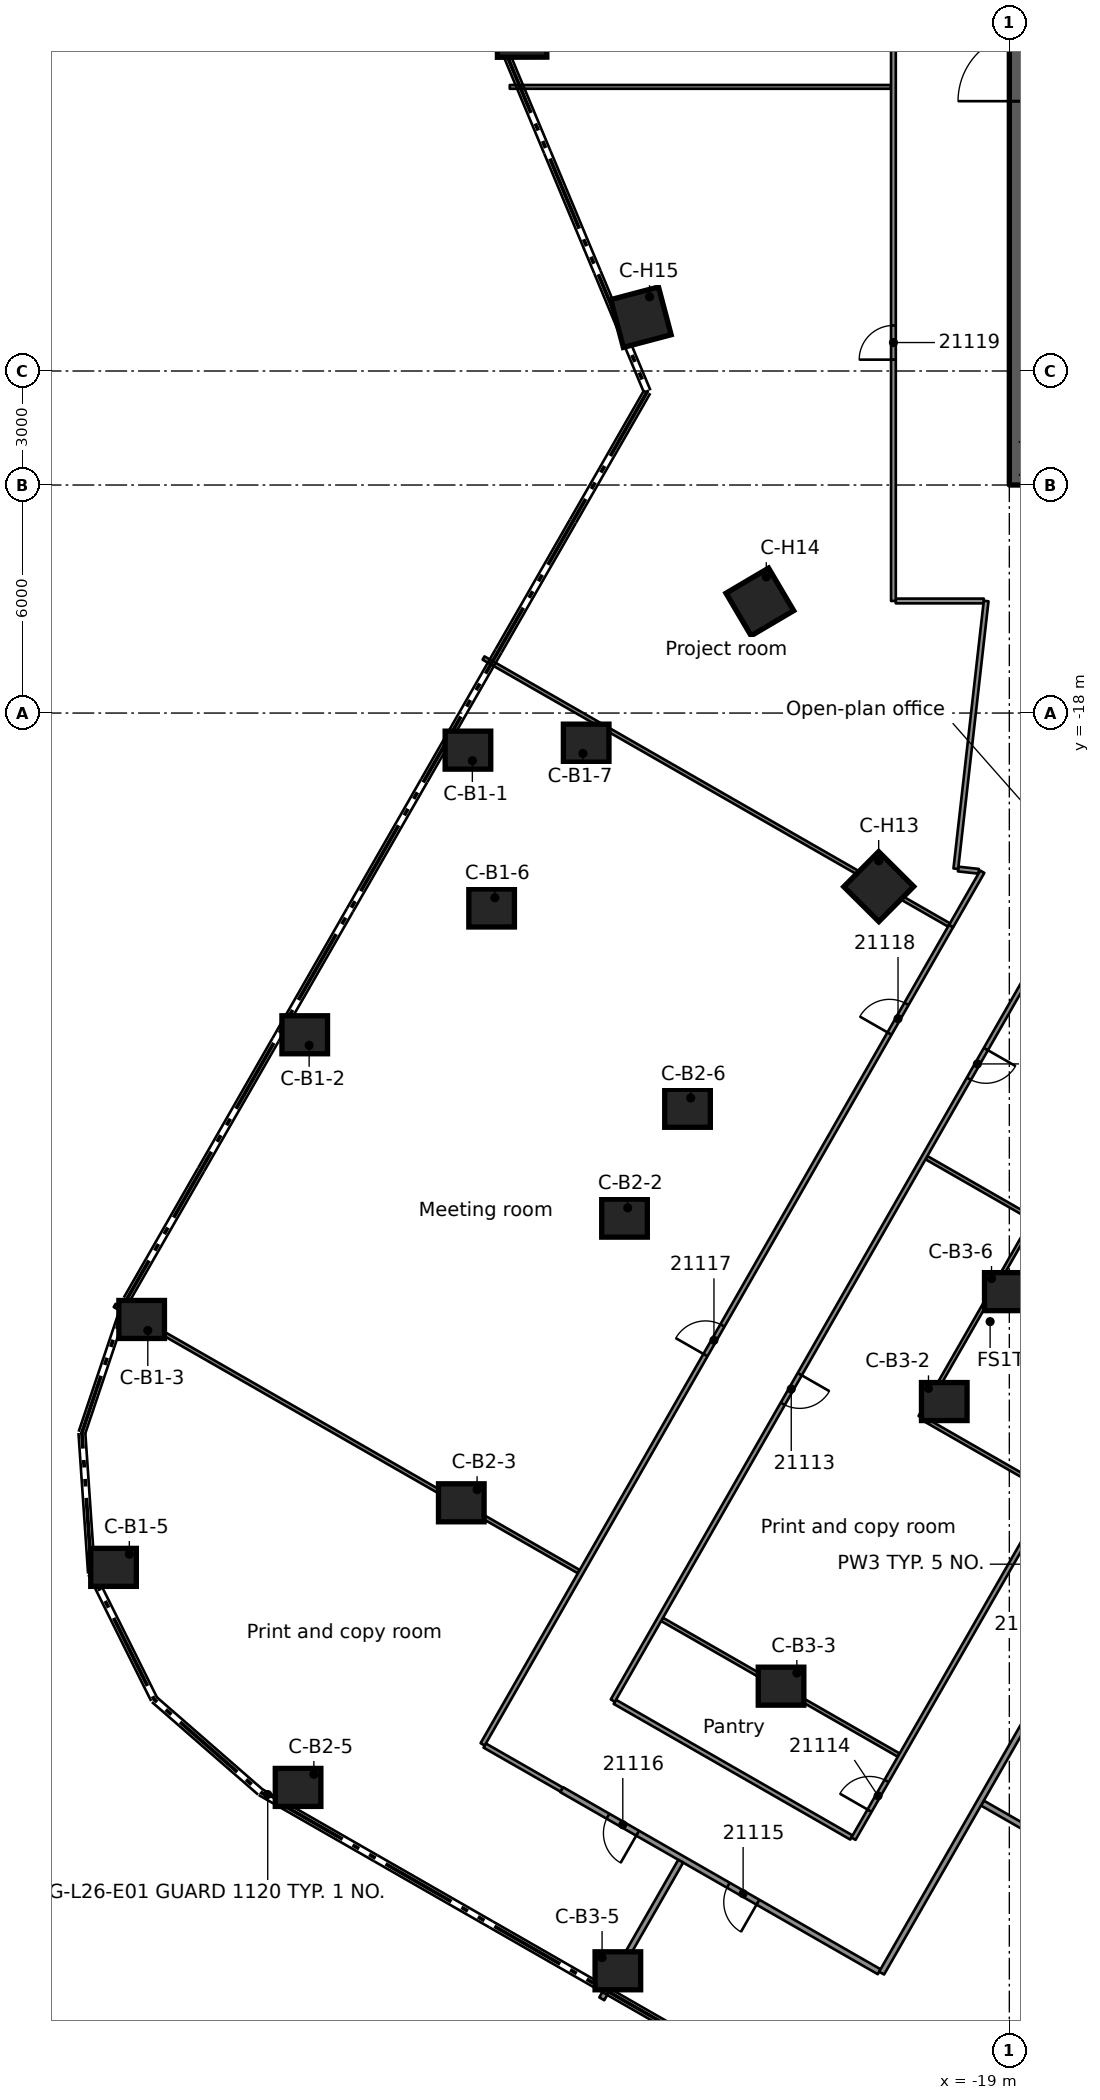
"""IFC4 building model, lengths in metres.
Left out: names, types, materials, properties, quantities, classifications, styles, units other than length and angle.
Written with IfcOpenShell. Run it as: python <this file> out.ifc"""

import sys

from ifc_helpers import new_model, si_unit, direction, frame, frame_2d, origin, origin_2d, place, context, subcontext, project, spatial, rectangle, extrude, element, fill, save


model = new_model("IFC4")
c1 = context("Model", 3, precision=1e-05, world=origin(), true_north=direction((0.0, 1.0)))
c2 = subcontext(c1, "Body", "Model", "MODEL_VIEW")
j1 = project(units=[si_unit("LENGTHUNIT", "METRE"), si_unit("PLANEANGLEUNIT", "RADIAN")], contexts=[c1])
p1 = place(None, origin())
s1 = spatial("IfcSite", under=j1, at=p1, CompositionType="ELEMENT")
p2 = place(p1, origin())
s2 = spatial("IfcBuilding", under=s1, at=p2, CompositionType="ELEMENT")
p3 = place(p2, frame((0.0, 0.0, 105.7)))
s3 = spatial("IfcBuildingStorey", under=s2, at=p3, CompositionType="ELEMENT", Elevation=105.7)
p4 = place(p3, frame((-18.55, -12.0, 0.0), z_axis=(0.0, 0.0, 1.0), x_axis=(0.0, 1.0, 0.0)))
e1 = element("IfcWall", 1, at=p4, inside=s3, PredefinedType="SHEAR", context=c2, shape_type="SweptSolid", body=[
    extrude(rectangle(XDim=24.0, YDim=0.9, at=frame_2d((12.0, 0.0))), origin(), (0.0, 0.0, 1.0), 3.5),
])
p5 = place(p4, frame((10.1, 0.0, 0.0)))
e2 = element("IfcOpeningElement", 2, at=p5, cuts=e1, PredefinedType="OPENING", context=c2, shape_type="SweptSolid", body=[
    extrude(rectangle(XDim=1.8, YDim=2.1, at=frame_2d((0.9, 1.05))), frame((0.0, 0.46, 0.0), z_axis=(0.0, -1.0, 0.0), x_axis=(1.0, 0.0, 0.0)), (0.0, 0.0, 1.0), 0.92),
])
for number, where, z_axis, x_axis in (
    (3, (-33.246, -18.976, 0.0), (0.0, 0.0, 1.0), (1.0, 0.0, 0.0)),
    (4, (-37.541, -26.465, 0.0), (0.0, 0.0, 1.0), (1.0, 0.0, 0.0)),
    (5, (-41.832, -33.956, 0.0), (0.0, 0.0, 1.0), (1.0, 0.0, 0.0)),
    (6, (-42.572, -40.479, 0.0), (0.0, 0.0, 1.0), (1.0, 0.0, 0.0)),
    (7, (-32.623, -23.129, 0.0), (0.0, 0.0, 1.0), (1.0, 0.0, 0.0)),
    (8, (-30.135, -18.792, 0.0), (0.0, 0.0, 1.0), (1.0, 0.0, 0.0)),
    (9, (-29.126, -31.29, 0.0), (0.0, 0.0, 1.0), (1.0, 0.0, 0.0)),
    (10, (-33.421, -38.78, 0.0), (0.0, 0.0, 1.0), (1.0, 0.0, 0.0)),
    (11, (-37.716, -46.269, 0.0), (0.0, 0.0, 1.0), (1.0, 0.0, 0.0)),
    (12, (-27.468, -28.399, 0.0), (0.0, 0.0, 1.0), (1.0, 0.0, 0.0)),
    (13, (-20.712, -36.116, 0.0), (0.0, 0.0, 1.0), (1.0, 0.0, 0.0)),
    (14, (-25.007, -43.605, 0.0), (0.0, 0.0, 1.0), (1.0, 0.0, 0.0)),
    (15, (-29.301, -51.094, 0.0), (0.0, 0.0, 1.0), (1.0, 0.0, 0.0)),
    (16, (-19.053, -33.224, 0.0), (0.0, 0.0, 1.0), (1.0, 0.0, 0.0)),
):
    element("IfcColumn", number, at=place(p3, frame(where, z_axis=z_axis, x_axis=x_axis)), inside=s3, PredefinedType="COLUMN", context=c2, shape_type="SweptSolid", body=[
        extrude(rectangle(XDim=1.2, YDim=1.0, at=origin_2d()), origin(), (0.0, 0.0, 1.0), 3.5),
    ])
for number, where, z_axis, x_axis in (
    (17, (-22.436, -22.567, 0.0), (0.0, 0.0, 1.0), (-0.705, -0.709, 0.0)),
    (18, (-25.565, -15.076, 0.0), (0.0, 0.0, 1.0), (-0.861, -0.508, 0.0)),
    (19, (-28.694, -7.584, 0.0), (0.0, 0.0, 1.0), (-0.967, -0.256, 0.0)),
    (20, (-31.822, -0.093, 0.0), (0.0, 0.0, 1.0), (-1.0, -0.003, 0.0)),
):
    element("IfcColumn", number, at=place(p3, frame(where, z_axis=z_axis, x_axis=x_axis)), inside=s3, PredefinedType="COLUMN", context=c2, shape_type="SweptSolid", body=[
        extrude(rectangle(XDim=1.3, YDim=1.3, at=origin_2d()), origin(), (0.0, 0.0, 1.0), 3.5),
    ])
p6 = place(p3, frame((-32.805, -45.167, 0.0), z_axis=(0.0, 0.0, 1.0), x_axis=(0.867850650995, -0.496825168009, 0.0)))
e21 = element("IfcWall", 21, at=p6, inside=s3, PredefinedType="PARTITIONING", context=c2, shape_type="SweptSolid", body=[
    extrude(rectangle(XDim=2.337, YDim=0.125, at=frame_2d((1.168, 0.0))), origin(), (0.0, 0.0, 1.0), 3.08),
])
p7 = place(p3, frame((-22.424, -51.119, 0.0), z_axis=(0.0, 0.0, 1.0), x_axis=(-0.867497896771, 0.497440849849, 0.0)))
e22 = element("IfcWall", 22, at=p7, inside=s3, PredefinedType="PARTITIONING", context=c2, shape_type="SweptSolid", body=[
    extrude(rectangle(XDim=9.629, YDim=0.15, at=frame_2d((4.814, 0.0))), origin(), (0.0, 0.0, 1.0), 3.08),
])
p8 = place(p7, frame((3.678, 0.0, 0.0)))
e23 = element("IfcOpeningElement", 23, at=p8, cuts=e22, PredefinedType="OPENING", context=c2, shape_type="SweptSolid", body=[
    extrude(rectangle(XDim=0.9, YDim=2.1, at=frame_2d((0.45, 1.05))), frame((0.0, 0.085, 0.0), z_axis=(0.0, -1.0, 0.0), x_axis=(1.0, 0.0, 0.0)), (0.0, 0.0, 1.0), 0.17),
])
p9 = place(p7, frame((7.328, 0.0, 0.0)))
e24 = element("IfcOpeningElement", 24, at=p9, cuts=e22, PredefinedType="OPENING", context=c2, shape_type="SweptSolid", body=[
    extrude(rectangle(XDim=0.9, YDim=2.1, at=frame_2d((0.45, 1.05))), frame((0.0, 0.085, 0.0), z_axis=(0.0, -1.0, 0.0), x_axis=(1.0, 0.0, 0.0)), (0.0, 0.0, 1.0), 0.17),
])
p10 = place(p3, frame((-29.38, -44.017, 0.0), z_axis=(0.0, 0.0, 1.0), x_axis=(0.867475811481, -0.497479362885, 0.0)))
e25 = element("IfcWall", 25, at=p10, inside=s3, PredefinedType="PARTITIONING", context=c2, shape_type="SweptSolid", body=[
    extrude(rectangle(XDim=7.176, YDim=0.125, at=frame_2d((3.588, 0.0))), origin(), (0.0, 0.0, 1.0), 3.08),
])
p11 = place(p3, frame((-42.542, -33.587, 0.0), z_axis=(0.0, 0.0, 1.0), x_axis=(0.867466270896, -0.497495998835, 0.0)))
e26 = element("IfcWall", 26, at=p11, inside=s3, PredefinedType="PARTITIONING", context=c2, shape_type="SweptSolid", body=[
    extrude(rectangle(XDim=14.079, YDim=0.1, at=frame_2d((7.04, 0.0))), origin(), (0.0, 0.0, 1.0), 3.08),
])
p12 = place(p3, frame((-28.138, -41.848, 0.0), z_axis=(0.0, 0.0, 1.0), x_axis=(0.867478179125, -0.4974752343, 0.0)))
e27 = element("IfcWall", 27, at=p12, inside=s3, PredefinedType="PARTITIONING", context=c2, shape_type="SweptSolid", body=[
    extrude(rectangle(XDim=7.178, YDim=0.1, at=frame_2d((3.589, 0.0))), origin(), (0.0, 0.0, 1.0), 3.08),
])
p13 = place(p3, frame((-19.709, -46.681, 0.0), z_axis=(0.0, 0.0, 1.0), x_axis=(0.867456145265, -0.497513654126, 0.0)))
e28 = element("IfcWall", 28, at=p13, inside=s3, PredefinedType="PARTITIONING", context=c2, shape_type="SweptSolid", body=[
    extrude(rectangle(XDim=14.07, YDim=0.15, at=frame_2d((7.035, 0.0))), origin(), (0.0, 0.0, 1.0), 3.08),
])
p14 = place(p3, frame((-21.302, -36.546, 0.0), z_axis=(0.0, 0.0, 1.0), x_axis=(0.867492112241, -0.49745093748, 0.0)))
e29 = element("IfcWall", 29, at=p14, inside=s3, PredefinedType="PARTITIONING", context=c2, shape_type="SweptSolid", body=[
    extrude(rectangle(XDim=3.886, YDim=0.1, at=frame_2d((1.943, 0.0))), origin(), (0.0, 0.0, 1.0), 3.08),
])
p15 = place(p3, frame((-21.181, -29.699, 0.0), z_axis=(0.0, 0.0, 1.0), x_axis=(0.867554846835, -0.497341520219, 0.0)))
e30 = element("IfcWall", 30, at=p15, inside=s3, PredefinedType="PARTITIONING", context=c2, shape_type="SweptSolid", body=[
    extrude(rectangle(XDim=7.19, YDim=0.1, at=frame_2d((3.595, 0.0))), origin(), (0.0, 0.0, 1.0), 3.08),
])
p16 = place(p3, frame((-32.836, -16.552, 0.0), z_axis=(0.0, 0.0, 1.0), x_axis=(0.867495211783, -0.497445532229, 0.0)))
e31 = element("IfcWall", 31, at=p16, inside=s3, PredefinedType="PARTITIONING", context=c2, shape_type="SweptSolid", body=[
    extrude(rectangle(XDim=14.12, YDim=0.1, at=frame_2d((7.06, 0.0))), origin(), (0.0, 0.0, 1.0), 3.08),
])
p17 = place(p3, frame((-20.345, -22.104, 0.0), z_axis=(0.0, 0.0, 1.0), x_axis=(0.993828621155, -0.110926425047, 0.0)))
e32 = element("IfcWall", 32, at=p17, inside=s3, PredefinedType="PARTITIONING", context=c2, shape_type="SweptSolid", body=[
    extrude(rectangle(XDim=0.542, YDim=0.125, at=frame_2d((0.271, 0.0))), origin(), (0.0, 0.0, 1.0), 3.08),
])
p18 = place(p3, frame((-21.988, -15.051, 0.0), z_axis=(0.0, 0.0, 1.0), x_axis=(1.0, 0.0, 0.0)))
e33 = element("IfcWall", 33, at=p18, inside=s3, PredefinedType="PARTITIONING", context=c2, shape_type="SweptSolid", body=[
    extrude(rectangle(XDim=2.316, YDim=0.125, at=frame_2d((1.158, 0.0))), origin(), (0.0, 0.0, 1.0), 3.08),
])
p19 = place(p3, frame((-32.146, -1.524, 0.0), z_axis=(0.0, 0.0, 1.0), x_axis=(1.0, 0.0, 0.0)))
e34 = element("IfcWall", 34, at=p19, inside=s3, PredefinedType="PARTITIONING", context=c2, shape_type="SweptSolid", body=[
    extrude(rectangle(XDim=10.033, YDim=0.1, at=frame_2d((5.017, 0.0))), origin(), (0.0, 0.0, 1.0), 3.08),
])
p20 = place(p3, frame((-19.712, -22.175, 0.0), z_axis=(0.0, 0.0, 1.0), x_axis=(-0.497428639805, -0.867504898143, 0.0)))
e35 = element("IfcWall", 35, at=p20, inside=s3, PredefinedType="PARTITIONING", context=c2, shape_type="SweptSolid", body=[
    extrude(rectangle(XDim=1.651, YDim=0.125, at=frame_2d((0.825, 0.0))), origin(), (0.0, 0.0, 1.0), 3.08),
])
p21 = place(p3, frame((-10.02, -29.636, 0.0), z_axis=(0.0, 0.0, 1.0), x_axis=(-0.49748968286, -0.867469893107, 0.0)))
e36 = element("IfcWall", 36, at=p21, inside=s3, PredefinedType="PARTITIONING", context=c2, shape_type="SweptSolid", body=[
    extrude(rectangle(XDim=24.807, YDim=0.15, at=frame_2d((12.403, 0.0))), origin(), (0.0, 0.0, 1.0), 3.08),
])
p22 = place(p21, frame((2.35, 0.0, 0.0)))
e37 = element("IfcOpeningElement", 37, at=p22, cuts=e36, PredefinedType="OPENING", context=c2, shape_type="SweptSolid", body=[
    extrude(rectangle(XDim=1.1, YDim=2.1, at=frame_2d((0.55, 1.05))), frame((0.0, 0.085, 0.0), z_axis=(0.0, -1.0, 0.0), x_axis=(1.0, 0.0, 0.0)), (0.0, 0.0, 1.0), 0.17),
])
p23 = place(p21, frame((8.707, 0.0, 0.0)))
e38 = element("IfcOpeningElement", 38, at=p23, cuts=e36, PredefinedType="OPENING", context=c2, shape_type="SweptSolid", body=[
    extrude(rectangle(XDim=1.8, YDim=2.1, at=frame_2d((0.9, 1.05))), frame((0.0, 0.085, 0.0), z_axis=(0.0, -1.0, 0.0), x_axis=(1.0, 0.0, 0.0)), (0.0, 0.0, 1.0), 0.17),
])
p24 = place(p21, frame((15.957, 0.0, 0.0)))
e39 = element("IfcOpeningElement", 39, at=p24, cuts=e36, PredefinedType="OPENING", context=c2, shape_type="SweptSolid", body=[
    extrude(rectangle(XDim=1.1, YDim=2.1, at=frame_2d((0.55, 1.05))), frame((0.0, 0.085, 0.0), z_axis=(0.0, -1.0, 0.0), x_axis=(1.0, 0.0, 0.0)), (0.0, 0.0, 1.0), 0.17),
])
p25 = place(p3, frame((-23.101, -47.618, 0.0), z_axis=(0.0, 0.0, 1.0), x_axis=(0.497706797126, 0.867345343041, 0.0)))
e40 = element("IfcWall", 40, at=p25, inside=s3, PredefinedType="PARTITIONING", context=c2, shape_type="SweptSolid", body=[
    extrude(rectangle(XDim=21.772, YDim=0.125, at=frame_2d((10.886, 0.0))), origin(), (0.0, 0.0, 1.0), 3.08),
])
p26 = place(p25, frame((0.85, 0.0, 0.0)))
e41 = element("IfcOpeningElement", 41, at=p26, cuts=e40, PredefinedType="OPENING", context=c2, shape_type="SweptSolid", body=[
    extrude(rectangle(XDim=0.9, YDim=2.1, at=frame_2d((0.45, 1.05))), frame((0.0, 0.073, 0.0), z_axis=(0.0, -1.0, 0.0), x_axis=(1.0, 0.0, 0.0)), (0.0, 0.0, 1.0), 0.145),
])
p27 = place(p25, frame((13.1, 0.0, 0.0)))
e42 = element("IfcOpeningElement", 42, at=p27, cuts=e40, PredefinedType="OPENING", context=c2, shape_type="SweptSolid", body=[
    extrude(rectangle(XDim=0.9, YDim=2.1, at=frame_2d((0.45, 1.05))), frame((0.0, 0.073, 0.0), z_axis=(0.0, -1.0, 0.0), x_axis=(1.0, 0.0, 0.0)), (0.0, 0.0, 1.0), 0.145),
])
p28 = place(p3, frame((-29.724, -51.831, 0.0), z_axis=(0.0, 0.0, 1.0), x_axis=(0.49757424492, 0.867421391708, 0.0)))
e43 = element("IfcWall", 43, at=p28, inside=s3, PredefinedType="PARTITIONING", context=c2, shape_type="SweptSolid", body=[
    extrude(rectangle(XDim=4.175, YDim=0.15, at=frame_2d((2.087, 0.0))), origin(), (0.0, 0.0, 1.0), 3.08),
])
p29 = place(p3, frame((-21.345, -36.521, 0.0), z_axis=(0.0, 0.0, 1.0), x_axis=(0.497305055322, 0.867575749978, 0.0)))
e44 = element("IfcWall", 44, at=p29, inside=s3, PredefinedType="PARTITIONING", context=c2, shape_type="SweptSolid", body=[
    extrude(rectangle(XDim=5.95, YDim=0.1, at=frame_2d((2.975, 0.0))), origin(), (0.0, 0.0, 1.0), 3.08),
])
p30 = place(p3, frame((-18.449, -24.802, 0.0), z_axis=(0.0, 0.0, 1.0), x_axis=(-0.496915373234, -0.867799004288, 0.0)))
e45 = element("IfcWall", 45, at=p30, inside=s3, PredefinedType="PARTITIONING", context=c2, shape_type="SweptSolid", body=[
    extrude(rectangle(XDim=22.107, YDim=0.125, at=frame_2d((11.053, 0.0))), origin(), (0.0, 0.0, 1.0), 3.08),
])
p31 = place(p30, frame((2.35, 0.0, 0.0)))
e46 = element("IfcOpeningElement", 46, at=p31, cuts=e45, PredefinedType="OPENING", context=c2, shape_type="SweptSolid", body=[
    extrude(rectangle(XDim=0.9, YDim=2.1, at=frame_2d((0.45, 1.05))), frame((0.0, 0.073, 0.0), z_axis=(0.0, -1.0, 0.0), x_axis=(1.0, 0.0, 0.0)), (0.0, 0.0, 1.0), 0.145),
])
p32 = place(p30, frame((12.207, 0.0, 0.0)))
e47 = element("IfcOpeningElement", 47, at=p32, cuts=e45, PredefinedType="OPENING", context=c2, shape_type="SweptSolid", body=[
    extrude(rectangle(XDim=0.9, YDim=2.1, at=frame_2d((0.45, 1.05))), frame((0.0, 0.073, 0.0), z_axis=(0.0, -1.0, 0.0), x_axis=(1.0, 0.0, 0.0)), (0.0, 0.0, 1.0), 0.145),
])
p33 = place(p3, frame((-32.859, -45.136, 0.0), z_axis=(0.0, 0.0, 1.0), x_axis=(0.496796975504, 0.867866789969, 0.0)))
e48 = element("IfcWall", 48, at=p33, inside=s3, PredefinedType="PARTITIONING", context=c2, shape_type="SweptSolid", body=[
    extrude(rectangle(XDim=24.807, YDim=0.125, at=frame_2d((12.403, 0.0))), origin(), (0.0, 0.0, 1.0), 3.08),
])
p34 = place(p33, frame((11.801, 0.0, 0.0)))
e49 = element("IfcOpeningElement", 49, at=p34, cuts=e48, PredefinedType="OPENING", context=c2, shape_type="SweptSolid", body=[
    extrude(rectangle(XDim=0.9, YDim=2.1, at=frame_2d((0.45, 1.05))), frame((0.0, 0.073, 0.0), z_axis=(0.0, -1.0, 0.0), x_axis=(1.0, 0.0, 0.0)), (0.0, 0.0, 1.0), 0.145),
])
p35 = place(p33, frame((21.551, 0.0, 0.0)))
e50 = element("IfcOpeningElement", 50, at=p35, cuts=e48, PredefinedType="OPENING", context=c2, shape_type="SweptSolid", body=[
    extrude(rectangle(XDim=0.9, YDim=2.1, at=frame_2d((0.45, 1.05))), frame((0.0, 0.073, 0.0), z_axis=(0.0, -1.0, 0.0), x_axis=(1.0, 0.0, 0.0)), (0.0, 0.0, 1.0), 0.145),
])
p36 = place(p3, frame((-20.408, -22.096, 0.0), z_axis=(0.0, 0.0, 1.0), x_axis=(0.112548040262, 0.993646284466, 0.0)))
e51 = element("IfcWall", 51, at=p36, inside=s3, PredefinedType="PARTITIONING", context=c2, shape_type="SweptSolid", body=[
    extrude(rectangle(XDim=7.089, YDim=0.125, at=frame_2d((3.544, 0.0))), origin(), (0.0, 0.0, 1.0), 3.08),
])
p37 = place(p3, frame((-22.05, -15.051, 0.0), z_axis=(0.0, 0.0, 1.0), x_axis=(0.0, 1.0, 0.0)))
e52 = element("IfcWall", 52, at=p37, inside=s3, PredefinedType="PARTITIONING", context=c2, shape_type="SweptSolid", body=[
    extrude(rectangle(XDim=30.102, YDim=0.125, at=frame_2d((15.051, 0.0))), origin(), (0.0, 0.0, 1.0), 3.08),
])
p38 = place(p37, frame((6.35, 0.0, 0.0)))
e53 = element("IfcOpeningElement", 53, at=p38, cuts=e52, PredefinedType="OPENING", context=c2, shape_type="SweptSolid", body=[
    extrude(rectangle(XDim=0.9, YDim=2.1, at=frame_2d((0.45, 1.05))), frame((0.0, 0.073, 0.0), z_axis=(0.0, -1.0, 0.0), x_axis=(1.0, 0.0, 0.0)), (0.0, 0.0, 1.0), 0.145),
])
p39 = place(p37, frame((19.627, 0.0, 0.0)))
e54 = element("IfcOpeningElement", 54, at=p39, cuts=e52, PredefinedType="OPENING", context=c2, shape_type="SweptSolid", body=[
    extrude(rectangle(XDim=1.1, YDim=2.1, at=frame_2d((0.55, 1.05))), frame((0.0, 0.073, 0.0), z_axis=(0.0, -1.0, 0.0), x_axis=(1.0, 0.0, 0.0)), (0.0, 0.0, 1.0), 0.145),
])
p40 = place(p31, origin())
e55 = element("IfcDoor", 55, at=p40, inside=s3, OperationType="SINGLE_SWING_LEFT", PredefinedType="DOOR", context=c2, shape_type="SweptSolid", body=[
    extrude(rectangle(XDim=0.9, YDim=2.1, at=frame_2d((0.45, 1.05))), frame((0.0, 0.025, 0.0), z_axis=(0.0, -1.0, 0.0), x_axis=(1.0, 0.0, 0.0)), (0.0, 0.0, 1.0), 0.05),
])
fill(e46, e55)
p41 = place(p32, origin())
e56 = element("IfcDoor", 56, at=p41, inside=s3, OperationType="SINGLE_SWING_RIGHT", PredefinedType="DOOR", context=c2, shape_type="SweptSolid", body=[
    extrude(rectangle(XDim=0.9, YDim=2.1, at=frame_2d((0.45, 1.05))), frame((0.0, 0.025, 0.0), z_axis=(0.0, -1.0, 0.0), x_axis=(1.0, 0.0, 0.0)), (0.0, 0.0, 1.0), 0.05),
])
fill(e47, e56)
p42 = place(p26, origin())
e57 = element("IfcDoor", 57, at=p42, inside=s3, OperationType="SINGLE_SWING_LEFT", PredefinedType="DOOR", context=c2, shape_type="SweptSolid", body=[
    extrude(rectangle(XDim=0.9, YDim=2.1, at=frame_2d((0.45, 1.05))), frame((0.0, 0.025, 0.0), z_axis=(0.0, -1.0, 0.0), x_axis=(1.0, 0.0, 0.0)), (0.0, 0.0, 1.0), 0.05),
])
fill(e41, e57)
p43 = place(p8, origin())
e58 = element("IfcDoor", 58, at=p43, inside=s3, OperationType="SINGLE_SWING_LEFT", PredefinedType="DOOR", context=c2, shape_type="SweptSolid", body=[
    extrude(rectangle(XDim=0.9, YDim=2.1, at=frame_2d((0.45, 1.05))), frame((0.0, 0.025, 0.0), z_axis=(0.0, -1.0, 0.0), x_axis=(1.0, 0.0, 0.0)), (0.0, 0.0, 1.0), 0.05),
])
fill(e23, e58)
p44 = place(p9, origin())
e59 = element("IfcDoor", 59, at=p44, inside=s3, OperationType="SINGLE_SWING_RIGHT", PredefinedType="DOOR", context=c2, shape_type="SweptSolid", body=[
    extrude(rectangle(XDim=0.9, YDim=2.1, at=frame_2d((0.45, 1.05))), frame((0.0, 0.025, 0.0), z_axis=(0.0, -1.0, 0.0), x_axis=(1.0, 0.0, 0.0)), (0.0, 0.0, 1.0), 0.05),
])
fill(e24, e59)
p45 = place(p34, origin())
e60 = element("IfcDoor", 60, at=p45, inside=s3, OperationType="SINGLE_SWING_LEFT", PredefinedType="DOOR", context=c2, shape_type="SweptSolid", body=[
    extrude(rectangle(XDim=0.9, YDim=2.1, at=frame_2d((0.45, 1.05))), frame((0.0, 0.025, 0.0), z_axis=(0.0, -1.0, 0.0), x_axis=(1.0, 0.0, 0.0)), (0.0, 0.0, 1.0), 0.05),
])
fill(e49, e60)
p46 = place(p35, origin())
e61 = element("IfcDoor", 61, at=p46, inside=s3, OperationType="SINGLE_SWING_RIGHT", PredefinedType="DOOR", context=c2, shape_type="SweptSolid", body=[
    extrude(rectangle(XDim=0.9, YDim=2.1, at=frame_2d((0.45, 1.05))), frame((0.0, 0.025, 0.0), z_axis=(0.0, -1.0, 0.0), x_axis=(1.0, 0.0, 0.0)), (0.0, 0.0, 1.0), 0.05),
])
fill(e50, e61)
p47 = place(p38, origin())
e62 = element("IfcDoor", 62, at=p47, inside=s3, OperationType="SINGLE_SWING_LEFT", PredefinedType="DOOR", context=c2, shape_type="SweptSolid", body=[
    extrude(rectangle(XDim=0.9, YDim=2.1, at=frame_2d((0.45, 1.05))), frame((0.0, 0.025, 0.0), z_axis=(0.0, -1.0, 0.0), x_axis=(1.0, 0.0, 0.0)), (0.0, 0.0, 1.0), 0.05),
])
fill(e53, e62)
save(model, sys.argv[1])
